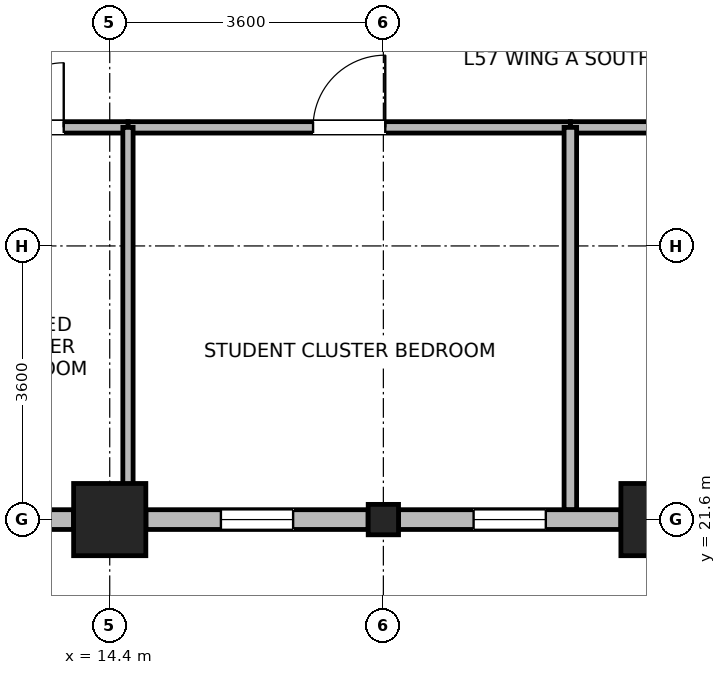
"""IFC4 building model, lengths in metres.
Left out: names, types, materials, properties, quantities, classifications, styles, units other than length and angle.
Written with IfcOpenShell. Run it as: python <this file> out.ifc"""

import sys

from ifc_helpers import new_model, si_unit, direction, frame, frame_2d, origin, origin_2d, place, context, subcontext, project, spatial, rectangle, i_section, extrude, source, transform, mapped, element, fill, save


model = new_model("IFC4")
c1 = context("Model", 3, precision=1e-05, world=origin(), true_north=direction((0.0, 1.0)))
c2 = subcontext(c1, "Body", "Model", "MODEL_VIEW")
j1 = project(units=[si_unit("LENGTHUNIT", "METRE"), si_unit("PLANEANGLEUNIT", "RADIAN")], contexts=[c1])
p1 = place(None, origin())
s1 = spatial("IfcSite", under=j1, at=p1, CompositionType="ELEMENT")
p2 = place(p1, origin())
s2 = spatial("IfcBuilding", under=s1, at=p2, CompositionType="ELEMENT")
p3 = place(p2, frame((0.0, 0.0, 224.0)))
s3 = spatial("IfcBuildingStorey", under=s2, at=p3, CompositionType="ELEMENT", Elevation=224.0)
m1 = source(origin(), c2, "Body", "SweptSolid", [
    extrude(rectangle(XDim=0.95, YDim=0.95, at=origin_2d()), origin(), (0.0, 0.0, 1.0), 3.7),
])
for number, where, z_axis, x_axis in (
    (1, (14.4, 21.6, 0.0), (0.0, 0.0, 1.0), (1.0, 0.0, 0.0)),
    (2, (21.6, 21.6, 0.0), (0.0, 0.0, 1.0), (1.0, 0.0, 0.0)),
):
    element("IfcColumn", number, at=place(p3, frame(where, z_axis=z_axis, x_axis=x_axis)), inside=s3, PredefinedType="COLUMN", context=c2, shape_type="MappedRepresentation", body=[
        mapped(m1, transform((0.0, 0.0, 0.0), x_axis=(1.0, 0.0, 0.0), y_axis=(0.0, 1.0, 0.0), z_axis=(0.0, 0.0, 1.0), scale=1.0)),
    ])
m2 = source(origin(), c2, "Body", "SweptSolid", [
    extrude(i_section(OverallWidth=0.399, OverallDepth=0.4, WebThickness=0.017, FlangeThickness=0.023, FilletRadius=0.015, at=origin_2d()), origin(), (0.0, 0.0, 1.0), 3.7),
])
p4 = place(p3, frame((18.0, 21.6, 0.0), z_axis=(0.0, 0.0, 1.0), x_axis=(1.0, 0.0, 0.0)))
e3 = element("IfcColumn", 3, at=p4, inside=s3, PredefinedType="COLUMN", context=c2, shape_type="MappedRepresentation", body=[
    mapped(m2, transform((0.0, 0.0, 0.0), x_axis=(1.0, 0.0, 0.0), y_axis=(0.0, 1.0, 0.0), z_axis=(0.0, 0.0, 1.0), scale=1.0)),
])
p5 = place(p3, frame((13.924, 21.6, 0.0), z_axis=(0.0, 0.0, 1.0), x_axis=(-1.0, 0.0, 0.0)))
e4 = element("IfcWall", 4, at=p5, inside=s3, PredefinedType="STANDARD", context=c2, shape_type="SweptSolid", body=[
    extrude(rectangle(XDim=7.089, YDim=0.26, at=frame_2d((3.544, 0.0))), origin(), (0.0, 0.0, 1.0), 3.45),
])
p6 = place(p5, frame((4.567, 0.0, 0.85)))
e5 = element("IfcOpeningElement", 5, at=p6, cuts=e4, PredefinedType="OPENING", context=c2, shape_type="SweptSolid", body=[
    extrude(rectangle(XDim=1.5, YDim=1.85, at=frame_2d((0.75, 0.925))), frame((0.0, 0.14, 0.0), z_axis=(0.0, -1.0, 0.0), x_axis=(1.0, 0.0, 0.0)), (0.0, 0.0, 1.0), 0.28),
])
p7 = place(p5, frame((3.07, 0.0, 0.85)))
e6 = element("IfcOpeningElement", 6, at=p7, cuts=e4, PredefinedType="OPENING", context=c2, shape_type="SweptSolid", body=[
    extrude(rectangle(XDim=0.95, YDim=1.75, at=frame_2d((0.475, 0.875))), frame((0.0, 0.14, 0.0), z_axis=(0.0, -1.0, 0.0), x_axis=(1.0, 0.0, 0.0)), (0.0, 0.0, 1.0), 0.28),
])
p8 = place(p3, frame((17.8, 21.6, 0.0), z_axis=(0.0, 0.0, 1.0), x_axis=(-1.0, 0.0, 0.0)))
e7 = element("IfcWall", 7, at=p8, inside=s3, PredefinedType="STANDARD", context=c2, shape_type="SweptSolid", body=[
    extrude(rectangle(XDim=2.924, YDim=0.26, at=frame_2d((1.462, 0.0))), origin(), (0.0, 0.0, 1.0), 3.05),
])
p9 = place(p8, frame((0.987, 0.0, 0.85)))
e8 = element("IfcOpeningElement", 8, at=p9, cuts=e7, PredefinedType="OPENING", context=c2, shape_type="SweptSolid", body=[
    extrude(rectangle(XDim=0.95, YDim=1.75, at=frame_2d((0.475, 0.875))), frame((0.0, 0.14, 0.0), z_axis=(0.0, -1.0, 0.0), x_axis=(1.0, 0.0, 0.0)), (0.0, 0.0, 1.0), 0.28),
])
p10 = place(p3, frame((21.124, 21.6, 0.0), z_axis=(0.0, 0.0, 1.0), x_axis=(-1.0, 0.0, 0.0)))
e9 = element("IfcWall", 9, at=p10, inside=s3, PredefinedType="STANDARD", context=c2, shape_type="SweptSolid", body=[
    extrude(rectangle(XDim=2.924, YDim=0.26, at=frame_2d((1.462, 0.0))), origin(), (0.0, 0.0, 1.0), 3.05),
])
p11 = place(p10, frame((0.987, 0.0, 0.85)))
e10 = element("IfcOpeningElement", 10, at=p11, cuts=e9, PredefinedType="OPENING", context=c2, shape_type="SweptSolid", body=[
    extrude(rectangle(XDim=0.95, YDim=1.75, at=frame_2d((0.475, 0.875))), frame((0.0, 0.14, 0.0), z_axis=(0.0, -1.0, 0.0), x_axis=(1.0, 0.0, 0.0)), (0.0, 0.0, 1.0), 0.28),
])
p12 = place(p3, frame((20.46, 26.76, 0.0), z_axis=(0.0, 0.0, 1.0), x_axis=(1.0, 0.0, 0.0)))
e11 = element("IfcWall", 11, at=p12, inside=s3, PredefinedType="PARTITIONING", context=c2, shape_type="SweptSolid", body=[
    extrude(rectangle(XDim=6.24, YDim=0.15, at=frame_2d((3.12, 0.0))), origin(), (0.0, 0.0, 1.0), 3.45),
])
p13 = place(p12, frame((2.645, 0.0, 0.0)))
e12 = element("IfcOpeningElement", 12, at=p13, cuts=e11, PredefinedType="OPENING", context=c2, shape_type="SweptSolid", body=[
    extrude(rectangle(XDim=0.95, YDim=2.1, at=frame_2d((0.475, 1.05))), frame((0.0, 0.085, 0.0), z_axis=(0.0, -1.0, 0.0), x_axis=(1.0, 0.0, 0.0)), (0.0, 0.0, 1.0), 0.17),
])
p14 = place(p3, frame((14.64, 26.76, 0.0), z_axis=(0.0, 0.0, 1.0), x_axis=(1.0, 0.0, 0.0)))
e13 = element("IfcWall", 13, at=p14, inside=s3, PredefinedType="PARTITIONING", context=c2, shape_type="SweptSolid", body=[
    extrude(rectangle(XDim=5.82, YDim=0.15, at=frame_2d((2.91, 0.0))), origin(), (0.0, 0.0, 1.0), 3.45),
])
p15 = place(p14, frame((2.435, 0.0, 0.0)))
e14 = element("IfcOpeningElement", 14, at=p15, cuts=e13, PredefinedType="OPENING", context=c2, shape_type="SweptSolid", body=[
    extrude(rectangle(XDim=0.95, YDim=2.1, at=frame_2d((0.475, 1.05))), frame((0.0, 0.085, 0.0), z_axis=(0.0, -1.0, 0.0), x_axis=(1.0, 0.0, 0.0)), (0.0, 0.0, 1.0), 0.17),
])
p16 = place(p3, frame((12.1, 26.76, 0.0), z_axis=(0.0, 0.0, 1.0), x_axis=(1.0, 0.0, 0.0)))
e15 = element("IfcWall", 15, at=p16, inside=s3, PredefinedType="PARTITIONING", context=c2, shape_type="SweptSolid", body=[
    extrude(rectangle(XDim=2.54, YDim=0.15, at=frame_2d((1.27, 0.0))), origin(), (0.0, 0.0, 1.0), 3.45),
])
p17 = place(p16, frame((0.845, 0.0, 0.0)))
e16 = element("IfcOpeningElement", 16, at=p17, cuts=e15, PredefinedType="OPENING", context=c2, shape_type="SweptSolid", body=[
    extrude(rectangle(XDim=0.85, YDim=2.04, at=frame_2d((0.425, 1.02))), frame((0.0, 0.085, 0.0), z_axis=(0.0, -1.0, 0.0), x_axis=(1.0, 0.0, 0.0)), (0.0, 0.0, 1.0), 0.17),
])
p18 = place(p3, frame((14.64, 21.732, 0.0), z_axis=(0.0, 0.0, 1.0), x_axis=(0.0, 1.0, 0.0)))
e17 = element("IfcWall", 17, at=p18, inside=s3, PredefinedType="PARTITIONING", context=c2, shape_type="SweptSolid", body=[
    extrude(rectangle(XDim=5.028, YDim=0.135, at=frame_2d((2.514, 0.0))), origin(), (0.0, 0.0, 1.0), 3.45),
])
p19 = place(p3, frame((20.46, 21.732, 0.0), z_axis=(0.0, 0.0, 1.0), x_axis=(0.0, 1.0, 0.0)))
e18 = element("IfcWall", 18, at=p19, inside=s3, PredefinedType="PARTITIONING", context=c2, shape_type="SweptSolid", body=[
    extrude(rectangle(XDim=5.028, YDim=0.165, at=frame_2d((2.514, 0.0))), origin(), (0.0, 0.0, 1.0), 3.45),
])
p20 = place(p9, origin())
e19 = element("IfcWindow", 19, at=p20, inside=s3, PartitioningType="SINGLE_PANEL", PredefinedType="WINDOW", context=c2, shape_type="SweptSolid", body=[
    extrude(rectangle(XDim=0.95, YDim=1.75, at=frame_2d((0.475, 0.875))), frame((0.0, 0.03, 0.0), z_axis=(0.0, -1.0, 0.0), x_axis=(1.0, 0.0, 0.0)), (0.0, 0.0, 1.0), 0.06),
])
fill(e8, e19)
p21 = place(p11, origin())
e20 = element("IfcWindow", 20, at=p21, inside=s3, PartitioningType="SINGLE_PANEL", PredefinedType="WINDOW", context=c2, shape_type="SweptSolid", body=[
    extrude(rectangle(XDim=0.95, YDim=1.75, at=frame_2d((0.475, 0.875))), frame((0.0, 0.03, 0.0), z_axis=(0.0, -1.0, 0.0), x_axis=(1.0, 0.0, 0.0)), (0.0, 0.0, 1.0), 0.06),
])
fill(e10, e20)
p22 = place(p15, origin())
e21 = element("IfcDoor", 21, at=p22, inside=s3, OperationType="SINGLE_SWING_RIGHT", PredefinedType="DOOR", context=c2, shape_type="SweptSolid", body=[
    extrude(rectangle(XDim=0.95, YDim=2.1, at=frame_2d((0.475, 1.05))), frame((0.0, 0.025, 0.0), z_axis=(0.0, -1.0, 0.0), x_axis=(1.0, 0.0, 0.0)), (0.0, 0.0, 1.0), 0.05),
])
fill(e14, e21)
p23 = place(p17, origin())
e22 = element("IfcDoor", 22, at=p23, inside=s3, OperationType="SINGLE_SWING_RIGHT", PredefinedType="DOOR", context=c2, shape_type="SweptSolid", body=[
    extrude(rectangle(XDim=0.85, YDim=2.04, at=frame_2d((0.425, 1.02))), frame((0.0, 0.025, 0.0), z_axis=(0.0, -1.0, 0.0), x_axis=(1.0, 0.0, 0.0)), (0.0, 0.0, 1.0), 0.05),
])
fill(e16, e22)
save(model, sys.argv[1])
